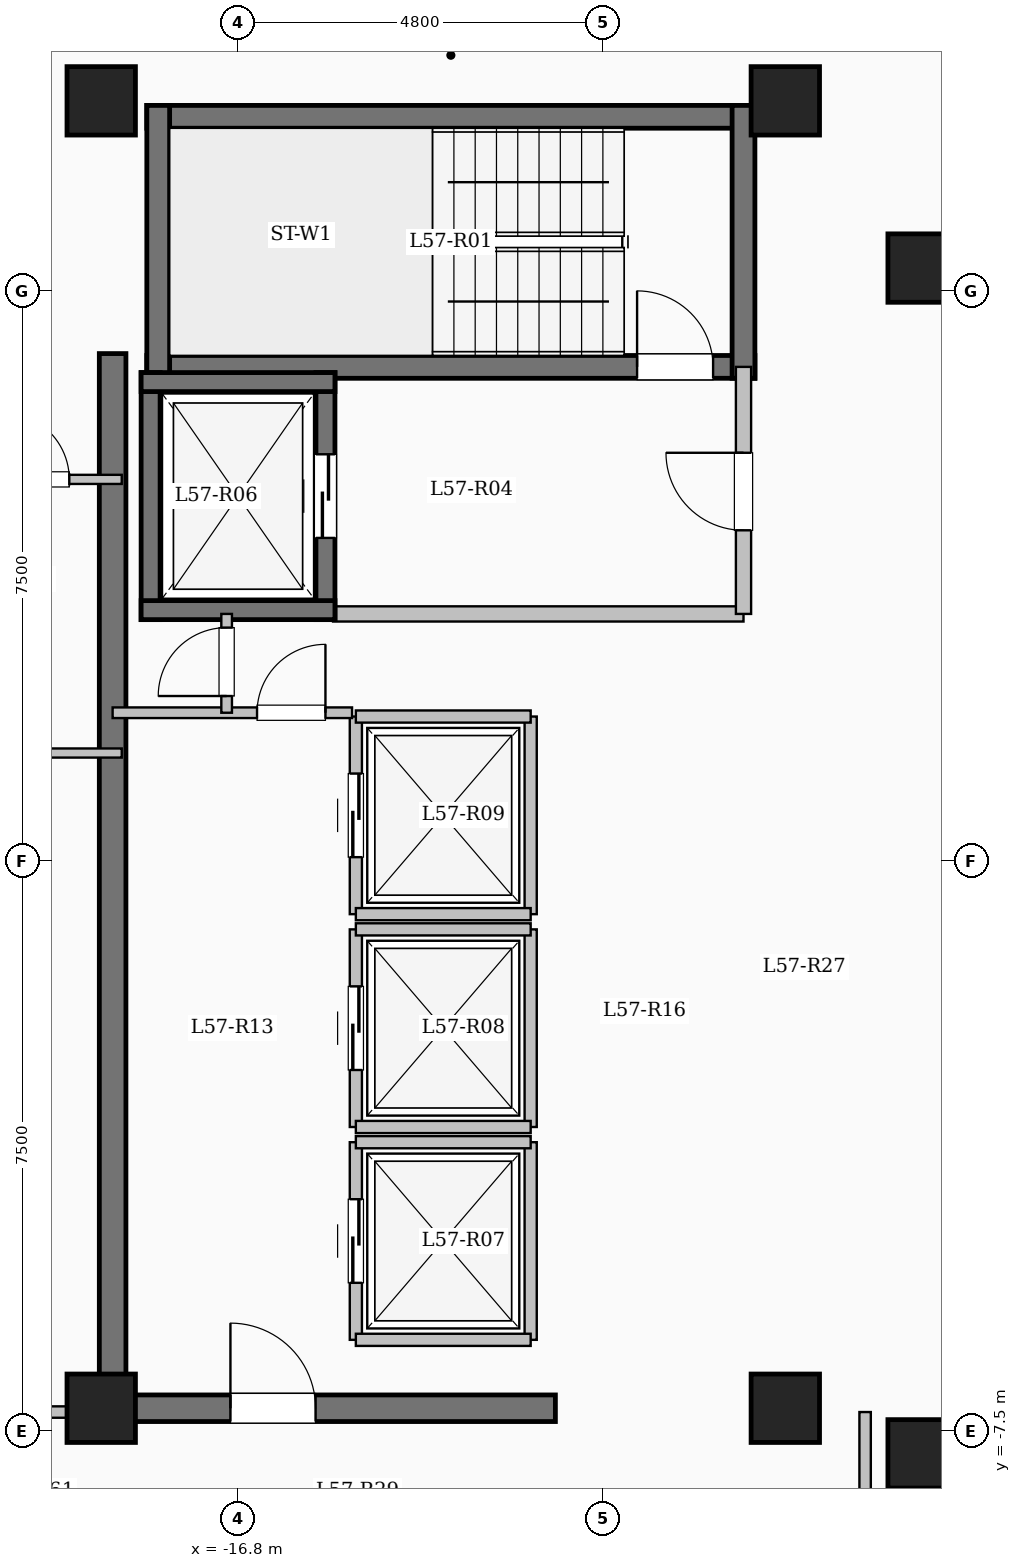
"""IFC4 building model, lengths in metres.
Left out: names, types, materials, properties, quantities, classifications, styles, units other than length and angle.
Written with IfcOpenShell. Run it as: python <this file> out.ifc"""

import sys

from ifc_helpers import new_model, si_unit, direction, frame, frame_2d, origin, origin_2d, place, context, subcontext, project, spatial, rectangle, extrude, element, fill, save


model = new_model("IFC4")
c1 = context("Model", 3, precision=1e-05, world=origin(), true_north=direction((0.0, 1.0)))
c2 = subcontext(c1, "Body", "Model", "MODEL_VIEW")
j1 = project(units=[si_unit("LENGTHUNIT", "METRE"), si_unit("PLANEANGLEUNIT", "RADIAN")], contexts=[c1])
p1 = place(None, origin())
s1 = spatial("IfcSite", under=j1, at=p1, CompositionType="ELEMENT")
p2 = place(p1, origin())
s2 = spatial("IfcBuilding", under=s1, at=p2, CompositionType="ELEMENT")
p3 = place(p2, frame((0.0, 0.0, 210.35)))
s3 = spatial("IfcBuildingStorey", under=s2, at=p3, CompositionType="ELEMENT", Elevation=210.35)
for number, where, z_axis, x_axis in (
    (1, (-7.8, -7.8, 0.0), (0.0, 0.0, 1.0), (1.0, 0.0, 0.0)),
    (2, (-7.8, 7.8, 0.0), (0.0, 0.0, 1.0), (1.0, 0.0, 0.0)),
    (3, (-9.6, -7.2, 0.0), (0.0, 0.0, 1.0), (1.0, 0.0, 0.0)),
    (4, (-9.6, 10.0, 0.0), (0.0, 0.0, 1.0), (1.0, 0.0, 0.0)),
    (5, (-18.6, -7.2, 0.0), (0.0, 0.0, 1.0), (1.0, 0.0, 0.0)),
    (6, (-18.6, 10.0, 0.0), (0.0, 0.0, 1.0), (1.0, 0.0, 0.0)),
):
    element("IfcColumn", number, at=place(p3, frame(where, z_axis=z_axis, x_axis=x_axis)), inside=s3, PredefinedType="COLUMN", context=c2, shape_type="SweptSolid", body=[
        extrude(rectangle(XDim=0.9, YDim=0.9, at=origin_2d()), origin(), (0.0, 0.0, 1.0), 3.35),
    ])
p4 = place(p3, frame((-18.0, 9.79, 0.0), z_axis=(0.0, 0.0, 1.0), x_axis=(1.0, 0.0, 0.0)))
e7 = element("IfcWall", 7, at=p4, inside=s3, PredefinedType="SHEAR", context=c2, shape_type="SweptSolid", body=[
    extrude(rectangle(XDim=8.0, YDim=0.3, at=frame_2d((4.0, 0.0))), origin(), (0.0, 0.0, 1.0), 3.35),
])
p5 = place(p3, frame((-18.0, 6.5, 0.0), z_axis=(0.0, 0.0, 1.0), x_axis=(1.0, 0.0, 0.0)))
e8 = element("IfcWall", 8, at=p5, inside=s3, PredefinedType="SHEAR", context=c2, shape_type="SweptSolid", body=[
    extrude(rectangle(XDim=8.0, YDim=0.3, at=frame_2d((4.0, 0.0))), origin(), (0.0, 0.0, 1.0), 3.35),
])
p6 = place(p5, frame((6.45, 0.0, 0.0)))
e9 = element("IfcOpeningElement", 9, at=p6, cuts=e8, PredefinedType="OPENING", context=c2, shape_type="SweptSolid", body=[
    extrude(rectangle(XDim=1.0, YDim=2.15, at=frame_2d((0.5, 1.075))), frame((0.0, 0.16, 0.0), z_axis=(0.0, -1.0, 0.0), x_axis=(1.0, 0.0, 0.0)), (0.0, 0.0, 1.0), 0.32),
])
for number, where, z_axis, x_axis in (
    (10, (-17.85, 6.35, 0.0), (0.0, 0.0, 1.0), (0.0, 1.0, 0.0)),
    (11, (-10.15, 6.35, 0.0), (0.0, 0.0, 1.0), (0.0, 1.0, 0.0)),
):
    element("IfcWall", number, at=place(p3, frame(where, z_axis=z_axis, x_axis=x_axis)), inside=s3, PredefinedType="SHEAR", context=c2, shape_type="SweptSolid", body=[
        extrude(rectangle(XDim=3.59, YDim=0.3, at=frame_2d((1.795, 0.0))), origin(), (0.0, 0.0, 1.0), 3.35),
    ])
p7 = place(p3, frame((-15.55, 3.25, 0.0), z_axis=(0.0, 0.0, 1.0), x_axis=(1.0, 0.0, 0.0)))
e12 = element("IfcWall", 12, at=p7, inside=s3, PredefinedType="SOLIDWALL", context=c2, shape_type="SweptSolid", body=[
    extrude(rectangle(XDim=5.4, YDim=0.2, at=frame_2d((2.7, 0.0))), origin(), (0.0, 0.0, 1.0), 3.1),
])
p8 = place(p3, frame((-10.15, 3.25, 0.0), z_axis=(0.0, 0.0, 1.0), x_axis=(0.0, 1.0, 0.0)))
e13 = element("IfcWall", 13, at=p8, inside=s3, PredefinedType="SOLIDWALL", context=c2, shape_type="SweptSolid", body=[
    extrude(rectangle(XDim=3.25, YDim=0.2, at=frame_2d((1.625, 0.0))), origin(), (0.0, 0.0, 1.0), 3.1),
])
p9 = place(p8, frame((1.1, 0.0, 0.0)))
e14 = element("IfcOpeningElement", 14, at=p9, cuts=e13, PredefinedType="OPENING", context=c2, shape_type="SweptSolid", body=[
    extrude(rectangle(XDim=1.02, YDim=2.15, at=frame_2d((0.51, 1.075))), frame((0.0, 0.11, 0.0), z_axis=(0.0, -1.0, 0.0), x_axis=(1.0, 0.0, 0.0)), (0.0, 0.0, 1.0), 0.22),
])
p10 = place(p3, frame((-17.95, 3.175, 0.0), z_axis=(0.0, 0.0, 1.0), x_axis=(0.0, 1.0, 0.0)))
e15 = element("IfcWall", 15, at=p10, inside=s3, PredefinedType="SHEAR", context=c2, shape_type="SweptSolid", body=[
    extrude(rectangle(XDim=3.25, YDim=0.25, at=frame_2d((1.625, 0.0))), origin(), (0.0, 0.0, 1.0), 3.35),
])
p11 = place(p3, frame((-15.65, 3.175, 0.0), z_axis=(0.0, 0.0, 1.0), x_axis=(0.0, 1.0, 0.0)))
e16 = element("IfcWall", 16, at=p11, inside=s3, PredefinedType="SHEAR", context=c2, shape_type="SweptSolid", body=[
    extrude(rectangle(XDim=3.25, YDim=0.25, at=frame_2d((1.625, 0.0))), origin(), (0.0, 0.0, 1.0), 3.35),
])
p12 = place(p11, frame((1.075, 0.0, 0.0)))
e17 = element("IfcOpeningElement", 17, at=p12, cuts=e16, PredefinedType="OPENING", context=c2, shape_type="SweptSolid", body=[
    extrude(rectangle(XDim=1.1, YDim=2.15, at=frame_2d((0.55, 1.075))), frame((0.0, 0.135, 0.0), z_axis=(0.0, -1.0, 0.0), x_axis=(1.0, 0.0, 0.0)), (0.0, 0.0, 1.0), 0.27),
])
for number, where, z_axis, x_axis in (
    (18, (-18.075, 3.3, 0.0), (0.0, 0.0, 1.0), (1.0, 0.0, 0.0)),
    (19, (-18.075, 6.3, 0.0), (0.0, 0.0, 1.0), (1.0, 0.0, 0.0)),
):
    element("IfcWall", number, at=place(p3, frame(where, z_axis=z_axis, x_axis=x_axis)), inside=s3, PredefinedType="SHEAR", context=c2, shape_type="SweptSolid", body=[
        extrude(rectangle(XDim=2.55, YDim=0.25, at=frame_2d((1.275, 0.0))), origin(), (0.0, 0.0, 1.0), 3.35),
    ])
p13 = place(p3, frame((-15.25, -6.3, 0.0), z_axis=(0.0, 0.0, 1.0), x_axis=(0.0, 1.0, 0.0)))
e20 = element("IfcWall", 20, at=p13, inside=s3, PredefinedType="SOLIDWALL", context=c2, shape_type="SweptSolid", body=[
    extrude(rectangle(XDim=2.6, YDim=0.16, at=frame_2d((1.3, 0.0))), origin(), (0.0, 0.0, 1.0), 3.1),
])
p14 = place(p13, frame((0.75, 0.0, 0.0)))
e21 = element("IfcOpeningElement", 21, at=p14, cuts=e20, PredefinedType="OPENING", context=c2, shape_type="SweptSolid", body=[
    extrude(rectangle(XDim=1.1, YDim=2.15, at=frame_2d((0.55, 1.075))), frame((0.0, 0.09, 0.0), z_axis=(0.0, -1.0, 0.0), x_axis=(1.0, 0.0, 0.0)), (0.0, 0.0, 1.0), 0.18),
])
p15 = place(p3, frame((-12.95, -6.3, 0.0), z_axis=(0.0, 0.0, 1.0), x_axis=(0.0, 1.0, 0.0)))
e22 = element("IfcWall", 22, at=p15, inside=s3, PredefinedType="SOLIDWALL", context=c2, shape_type="SweptSolid", body=[
    extrude(rectangle(XDim=2.6, YDim=0.16, at=frame_2d((1.3, 0.0))), origin(), (0.0, 0.0, 1.0), 3.1),
])
for number, where, z_axis, x_axis in (
    (23, (-15.25, -6.3, 0.0), (0.0, 0.0, 1.0), (1.0, 0.0, 0.0)),
    (24, (-15.25, -3.7, 0.0), (0.0, 0.0, 1.0), (1.0, 0.0, 0.0)),
):
    element("IfcWall", number, at=place(p3, frame(where, z_axis=z_axis, x_axis=x_axis)), inside=s3, PredefinedType="SOLIDWALL", context=c2, shape_type="SweptSolid", body=[
        extrude(rectangle(XDim=2.3, YDim=0.16, at=frame_2d((1.15, 0.0))), origin(), (0.0, 0.0, 1.0), 3.1),
    ])
p16 = place(p3, frame((-15.25, -3.5, 0.0), z_axis=(0.0, 0.0, 1.0), x_axis=(0.0, 1.0, 0.0)))
e25 = element("IfcWall", 25, at=p16, inside=s3, PredefinedType="SOLIDWALL", context=c2, shape_type="SweptSolid", body=[
    extrude(rectangle(XDim=2.6, YDim=0.16, at=frame_2d((1.3, 0.0))), origin(), (0.0, 0.0, 1.0), 3.1),
])
p17 = place(p16, frame((0.75, 0.0, 0.0)))
e26 = element("IfcOpeningElement", 26, at=p17, cuts=e25, PredefinedType="OPENING", context=c2, shape_type="SweptSolid", body=[
    extrude(rectangle(XDim=1.1, YDim=2.15, at=frame_2d((0.55, 1.075))), frame((0.0, 0.09, 0.0), z_axis=(0.0, -1.0, 0.0), x_axis=(1.0, 0.0, 0.0)), (0.0, 0.0, 1.0), 0.18),
])
p18 = place(p3, frame((-12.95, -3.5, 0.0), z_axis=(0.0, 0.0, 1.0), x_axis=(0.0, 1.0, 0.0)))
e27 = element("IfcWall", 27, at=p18, inside=s3, PredefinedType="SOLIDWALL", context=c2, shape_type="SweptSolid", body=[
    extrude(rectangle(XDim=2.6, YDim=0.16, at=frame_2d((1.3, 0.0))), origin(), (0.0, 0.0, 1.0), 3.1),
])
for number, where, z_axis, x_axis in (
    (28, (-15.25, -3.5, 0.0), (0.0, 0.0, 1.0), (1.0, 0.0, 0.0)),
    (29, (-15.25, -0.9, 0.0), (0.0, 0.0, 1.0), (1.0, 0.0, 0.0)),
):
    element("IfcWall", number, at=place(p3, frame(where, z_axis=z_axis, x_axis=x_axis)), inside=s3, PredefinedType="SOLIDWALL", context=c2, shape_type="SweptSolid", body=[
        extrude(rectangle(XDim=2.3, YDim=0.16, at=frame_2d((1.15, 0.0))), origin(), (0.0, 0.0, 1.0), 3.1),
    ])
p19 = place(p3, frame((-15.25, -0.7, 0.0), z_axis=(0.0, 0.0, 1.0), x_axis=(0.0, 1.0, 0.0)))
e30 = element("IfcWall", 30, at=p19, inside=s3, PredefinedType="SOLIDWALL", context=c2, shape_type="SweptSolid", body=[
    extrude(rectangle(XDim=2.6, YDim=0.16, at=frame_2d((1.3, 0.0))), origin(), (0.0, 0.0, 1.0), 3.1),
])
p20 = place(p19, frame((0.75, 0.0, 0.0)))
e31 = element("IfcOpeningElement", 31, at=p20, cuts=e30, PredefinedType="OPENING", context=c2, shape_type="SweptSolid", body=[
    extrude(rectangle(XDim=1.1, YDim=2.15, at=frame_2d((0.55, 1.075))), frame((0.0, 0.09, 0.0), z_axis=(0.0, -1.0, 0.0), x_axis=(1.0, 0.0, 0.0)), (0.0, 0.0, 1.0), 0.18),
])
p21 = place(p3, frame((-12.95, -0.7, 0.0), z_axis=(0.0, 0.0, 1.0), x_axis=(0.0, 1.0, 0.0)))
e32 = element("IfcWall", 32, at=p21, inside=s3, PredefinedType="SOLIDWALL", context=c2, shape_type="SweptSolid", body=[
    extrude(rectangle(XDim=2.6, YDim=0.16, at=frame_2d((1.3, 0.0))), origin(), (0.0, 0.0, 1.0), 3.1),
])
for number, where, z_axis, x_axis in (
    (33, (-15.25, -0.7, 0.0), (0.0, 0.0, 1.0), (1.0, 0.0, 0.0)),
    (34, (-15.25, 1.9, 0.0), (0.0, 0.0, 1.0), (1.0, 0.0, 0.0)),
):
    element("IfcWall", number, at=place(p3, frame(where, z_axis=z_axis, x_axis=x_axis)), inside=s3, PredefinedType="SOLIDWALL", context=c2, shape_type="SweptSolid", body=[
        extrude(rectangle(XDim=2.3, YDim=0.16, at=frame_2d((1.15, 0.0))), origin(), (0.0, 0.0, 1.0), 3.1),
    ])
p22 = place(p3, frame((-18.45, -7.375, 0.0), z_axis=(0.0, 0.0, 1.0), x_axis=(0.0, 1.0, 0.0)))
e35 = element("IfcWall", 35, at=p22, inside=s3, PredefinedType="SHEAR", context=c2, shape_type="SweptSolid", body=[
    extrude(rectangle(XDim=14.05, YDim=0.35, at=frame_2d((7.025, 0.0))), origin(), (0.0, 0.0, 1.0), 3.35),
])
p23 = place(p3, frame((-18.625, -7.2, 0.0), z_axis=(0.0, 0.0, 1.0), x_axis=(1.0, 0.0, 0.0)))
e36 = element("IfcWall", 36, at=p23, inside=s3, PredefinedType="SHEAR", context=c2, shape_type="SweptSolid", body=[
    extrude(rectangle(XDim=6.0, YDim=0.35, at=frame_2d((3.0, 0.0))), origin(), (0.0, 0.0, 1.0), 3.35),
])
p24 = place(p23, frame((1.725, 0.0, 0.0)))
e37 = element("IfcOpeningElement", 37, at=p24, cuts=e36, PredefinedType="OPENING", context=c2, shape_type="SweptSolid", body=[
    extrude(rectangle(XDim=1.12, YDim=2.15, at=frame_2d((0.56, 1.075))), frame((0.0, 0.185, 0.0), z_axis=(0.0, -1.0, 0.0), x_axis=(1.0, 0.0, 0.0)), (0.0, 0.0, 1.0), 0.37),
])
p25 = place(p3, frame((-18.45, 1.95, 0.0), z_axis=(0.0, 0.0, 1.0), x_axis=(1.0, 0.0, 0.0)))
e38 = element("IfcWall", 38, at=p25, inside=s3, PredefinedType="PARTITIONING", context=c2, shape_type="SweptSolid", body=[
    extrude(rectangle(XDim=3.15, YDim=0.14, at=frame_2d((1.575, 0.0))), origin(), (0.0, 0.0, 1.0), 3.1),
])
p26 = place(p25, frame((1.9, 0.0, 0.0)))
e39 = element("IfcOpeningElement", 39, at=p26, cuts=e38, PredefinedType="OPENING", context=c2, shape_type="SweptSolid", body=[
    extrude(rectangle(XDim=0.9, YDim=2.08, at=frame_2d((0.45, 1.04))), frame((0.0, 0.08, 0.0), z_axis=(0.0, -1.0, 0.0), x_axis=(1.0, 0.0, 0.0)), (0.0, 0.0, 1.0), 0.16),
])
p27 = place(p3, frame((-16.95, 1.95, 0.0), z_axis=(0.0, 0.0, 1.0), x_axis=(0.0, 1.0, 0.0)))
e40 = element("IfcWall", 40, at=p27, inside=s3, PredefinedType="PARTITIONING", context=c2, shape_type="SweptSolid", body=[
    extrude(rectangle(XDim=1.3, YDim=0.14, at=frame_2d((0.65, 0.0))), origin(), (0.0, 0.0, 1.0), 3.1),
])
p28 = place(p27, frame((0.22, 0.0, 0.0)))
e41 = element("IfcOpeningElement", 41, at=p28, cuts=e40, PredefinedType="OPENING", context=c2, shape_type="SweptSolid", body=[
    extrude(rectangle(XDim=0.9, YDim=2.08, at=frame_2d((0.45, 1.04))), frame((0.0, 0.08, 0.0), z_axis=(0.0, -1.0, 0.0), x_axis=(1.0, 0.0, 0.0)), (0.0, 0.0, 1.0), 0.16),
])
p29 = place(p3, frame((-8.55, -9.4, 0.0), z_axis=(0.0, 0.0, 1.0), x_axis=(0.0, 1.0, 0.0)))
e42 = element("IfcWall", 42, at=p29, inside=s3, PredefinedType="PARTITIONING", context=c2, shape_type="SweptSolid", body=[
    extrude(rectangle(XDim=2.15, YDim=0.15, at=frame_2d((1.075, 0.0))), origin(), (0.0, 0.0, 1.0), 3.1),
])
p30 = place(p3, frame((-23.58, -7.25, 0.0), z_axis=(0.0, 0.0, 1.0), x_axis=(1.0, 0.0, 0.0)))
e43 = element("IfcWall", 43, at=p30, inside=s3, PredefinedType="PARTITIONING", context=c2, shape_type="SweptSolid", body=[
    extrude(rectangle(XDim=5.13, YDim=0.15, at=frame_2d((2.565, 0.0))), origin(), (0.0, 0.0, 1.0), 3.1),
])
p31 = place(p30, frame((2.18, 0.0, 0.0)))
e44 = element("IfcOpeningElement", 44, at=p31, cuts=e43, PredefinedType="OPENING", context=c2, shape_type="SweptSolid", body=[
    extrude(rectangle(XDim=0.96, YDim=2.15, at=frame_2d((0.48, 1.075))), frame((0.0, 0.085, 0.0), z_axis=(0.0, -1.0, 0.0), x_axis=(1.0, 0.0, 0.0)), (0.0, 0.0, 1.0), 0.17),
])
p32 = place(p3, frame((-23.7, 1.42, 0.0), z_axis=(0.0, 0.0, 1.0), x_axis=(1.0, 0.0, 0.0)))
e45 = element("IfcWall", 45, at=p32, inside=s3, PredefinedType="PARTITIONING", context=c2, shape_type="SweptSolid", body=[
    extrude(rectangle(XDim=5.37, YDim=0.12, at=frame_2d((2.685, 0.0))), origin(), (0.0, 0.0, 1.0), 3.1),
])
p33 = place(p32, frame((0.937, 0.0, 0.0)))
e46 = element("IfcOpeningElement", 46, at=p33, cuts=e45, PredefinedType="OPENING", context=c2, shape_type="SweptSolid", body=[
    extrude(rectangle(XDim=0.88, YDim=2.1, at=frame_2d((0.44, 1.05))), frame((0.0, 0.07, 0.0), z_axis=(0.0, -1.0, 0.0), x_axis=(1.0, 0.0, 0.0)), (0.0, 0.0, 1.0), 0.14),
])
p34 = place(p32, frame((3.452, 0.0, 0.0)))
e47 = element("IfcOpeningElement", 47, at=p34, cuts=e45, PredefinedType="OPENING", context=c2, shape_type="SweptSolid", body=[
    extrude(rectangle(XDim=0.88, YDim=2.1, at=frame_2d((0.44, 1.05))), frame((0.0, 0.07, 0.0), z_axis=(0.0, -1.0, 0.0), x_axis=(1.0, 0.0, 0.0)), (0.0, 0.0, 1.0), 0.14),
])
p35 = place(p3, frame((-23.7, 5.02, 0.0), z_axis=(0.0, 0.0, 1.0), x_axis=(1.0, 0.0, 0.0)))
e48 = element("IfcWall", 48, at=p35, inside=s3, PredefinedType="PARTITIONING", context=c2, shape_type="SweptSolid", body=[
    extrude(rectangle(XDim=5.37, YDim=0.12, at=frame_2d((2.685, 0.0))), origin(), (0.0, 0.0, 1.0), 3.1),
])
p36 = place(p35, frame((3.8, 0.0, 0.0)))
e49 = element("IfcOpeningElement", 49, at=p36, cuts=e48, PredefinedType="OPENING", context=c2, shape_type="SweptSolid", body=[
    extrude(rectangle(XDim=0.88, YDim=2.1, at=frame_2d((0.44, 1.05))), frame((0.0, 0.07, 0.0), z_axis=(0.0, -1.0, 0.0), x_axis=(1.0, 0.0, 0.0)), (0.0, 0.0, 1.0), 0.14),
])
p37 = place(p6, origin())
e50 = element("IfcDoor", 50, at=p37, inside=s3, OperationType="SINGLE_SWING_LEFT", PredefinedType="DOOR", context=c2, shape_type="SweptSolid", body=[
    extrude(rectangle(XDim=1.0, YDim=2.15, at=frame_2d((0.5, 1.075))), frame((0.0, 0.025, 0.0), z_axis=(0.0, -1.0, 0.0), x_axis=(1.0, 0.0, 0.0)), (0.0, 0.0, 1.0), 0.05),
])
fill(e9, e50)
p38 = place(p9, origin())
e51 = element("IfcDoor", 51, at=p38, inside=s3, OperationType="SINGLE_SWING_RIGHT", PredefinedType="DOOR", context=c2, shape_type="SweptSolid", body=[
    extrude(rectangle(XDim=1.02, YDim=2.15, at=frame_2d((0.51, 1.075))), frame((0.0, 0.025, 0.0), z_axis=(0.0, -1.0, 0.0), x_axis=(1.0, 0.0, 0.0)), (0.0, 0.0, 1.0), 0.05),
])
fill(e14, e51)
p39 = place(p12, origin())
e52 = element("IfcDoor", 52, at=p39, inside=s3, OperationType="SLIDING_TO_LEFT", PredefinedType="DOOR", context=c2, shape_type="SweptSolid", body=[
    extrude(rectangle(XDim=1.1, YDim=2.15, at=frame_2d((0.55, 1.075))), frame((0.0, 0.025, 0.0), z_axis=(0.0, -1.0, 0.0), x_axis=(1.0, 0.0, 0.0)), (0.0, 0.0, 1.0), 0.05),
])
fill(e17, e52)
p40 = place(p14, origin())
e53 = element("IfcDoor", 53, at=p40, inside=s3, OperationType="SLIDING_TO_LEFT", PredefinedType="DOOR", context=c2, shape_type="SweptSolid", body=[
    extrude(rectangle(XDim=1.1, YDim=2.15, at=frame_2d((0.55, 1.075))), frame((0.0, 0.025, 0.0), z_axis=(0.0, -1.0, 0.0), x_axis=(1.0, 0.0, 0.0)), (0.0, 0.0, 1.0), 0.05),
])
fill(e21, e53)
p41 = place(p17, origin())
e54 = element("IfcDoor", 54, at=p41, inside=s3, OperationType="SLIDING_TO_LEFT", PredefinedType="DOOR", context=c2, shape_type="SweptSolid", body=[
    extrude(rectangle(XDim=1.1, YDim=2.15, at=frame_2d((0.55, 1.075))), frame((0.0, 0.025, 0.0), z_axis=(0.0, -1.0, 0.0), x_axis=(1.0, 0.0, 0.0)), (0.0, 0.0, 1.0), 0.05),
])
fill(e26, e54)
p42 = place(p20, origin())
e55 = element("IfcDoor", 55, at=p42, inside=s3, OperationType="SLIDING_TO_LEFT", PredefinedType="DOOR", context=c2, shape_type="SweptSolid", body=[
    extrude(rectangle(XDim=1.1, YDim=2.15, at=frame_2d((0.55, 1.075))), frame((0.0, 0.025, 0.0), z_axis=(0.0, -1.0, 0.0), x_axis=(1.0, 0.0, 0.0)), (0.0, 0.0, 1.0), 0.05),
])
fill(e31, e55)
p43 = place(p24, origin())
e56 = element("IfcDoor", 56, at=p43, inside=s3, OperationType="SINGLE_SWING_LEFT", PredefinedType="DOOR", context=c2, shape_type="SweptSolid", body=[
    extrude(rectangle(XDim=1.12, YDim=2.15, at=frame_2d((0.56, 1.075))), frame((0.0, 0.025, 0.0), z_axis=(0.0, -1.0, 0.0), x_axis=(1.0, 0.0, 0.0)), (0.0, 0.0, 1.0), 0.05),
])
fill(e37, e56)
p44 = place(p26, origin())
e57 = element("IfcDoor", 57, at=p44, inside=s3, OperationType="SINGLE_SWING_RIGHT", PredefinedType="DOOR", context=c2, shape_type="SweptSolid", body=[
    extrude(rectangle(XDim=0.9, YDim=2.08, at=frame_2d((0.45, 1.04))), frame((0.0, 0.025, 0.0), z_axis=(0.0, -1.0, 0.0), x_axis=(1.0, 0.0, 0.0)), (0.0, 0.0, 1.0), 0.05),
])
fill(e39, e57)
p45 = place(p28, origin())
e58 = element("IfcDoor", 58, at=p45, inside=s3, OperationType="SINGLE_SWING_LEFT", PredefinedType="DOOR", context=c2, shape_type="SweptSolid", body=[
    extrude(rectangle(XDim=0.9, YDim=2.08, at=frame_2d((0.45, 1.04))), frame((0.0, 0.025, 0.0), z_axis=(0.0, -1.0, 0.0), x_axis=(1.0, 0.0, 0.0)), (0.0, 0.0, 1.0), 0.05),
])
fill(e41, e58)
p46 = place(p36, origin())
e59 = element("IfcDoor", 59, at=p46, inside=s3, OperationType="SINGLE_SWING_LEFT", PredefinedType="DOOR", context=c2, shape_type="SweptSolid", body=[
    extrude(rectangle(XDim=0.88, YDim=2.1, at=frame_2d((0.44, 1.05))), frame((0.0, 0.025, 0.0), z_axis=(0.0, -1.0, 0.0), x_axis=(1.0, 0.0, 0.0)), (0.0, 0.0, 1.0), 0.05),
])
fill(e49, e59)
save(model, sys.argv[1])
